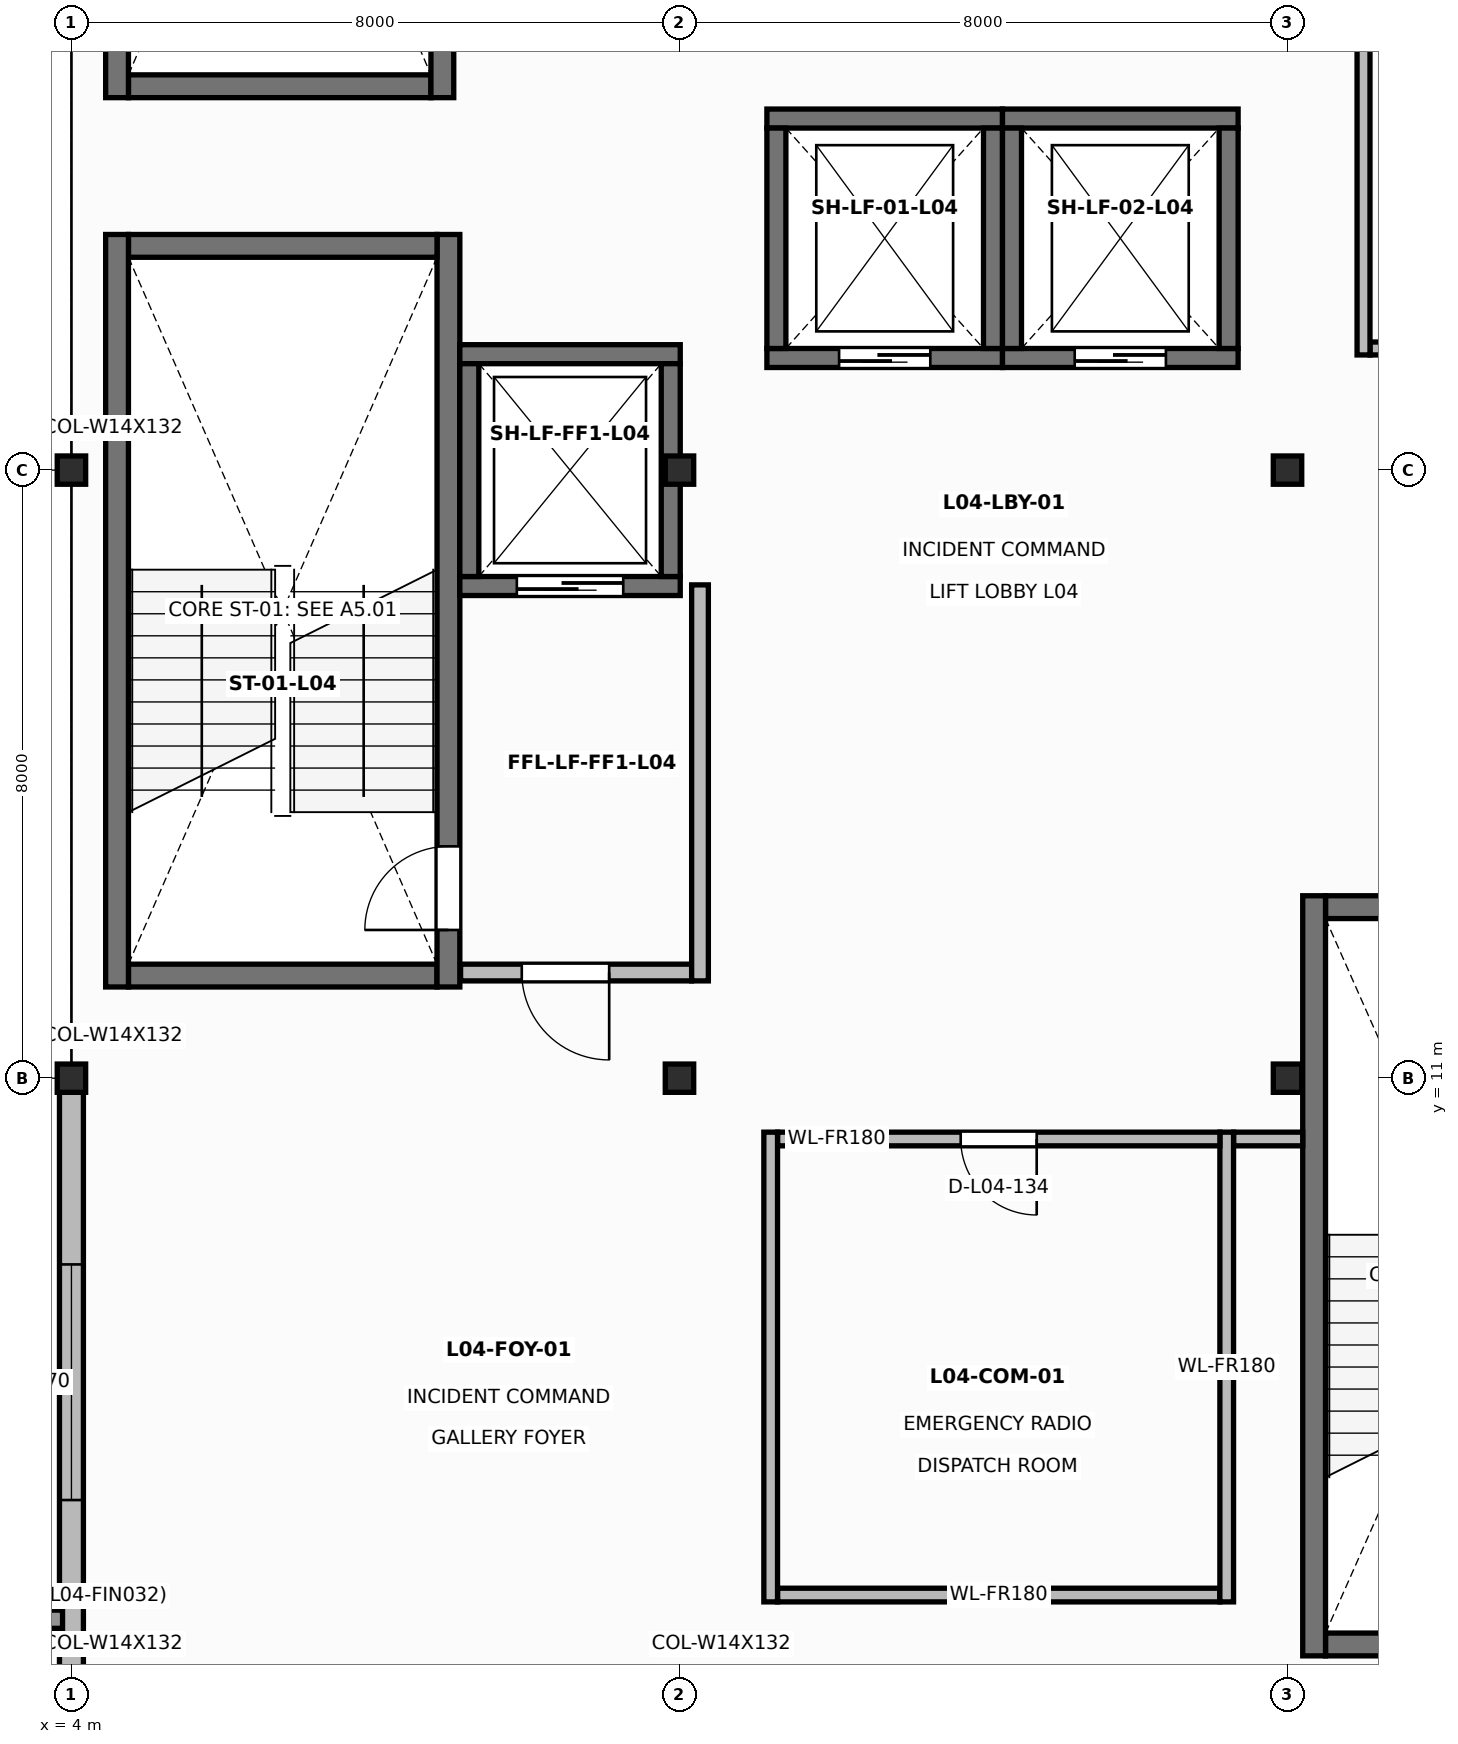
"""IFC4 building model, lengths in metres.
Left out: names, types, materials, properties, quantities, classifications, styles, units other than length and angle.
Written with IfcOpenShell. Run it as: python <this file> out.ifc"""

import sys

from ifc_helpers import new_model, si_unit, direction, frame, frame_2d, origin, origin_2d, place, context, subcontext, project, spatial, rectangle, i_section, extrude, element, fill, save


model = new_model("IFC4")
c1 = context("Model", 3, precision=1e-05, world=origin(), true_north=direction((0.0, 1.0)))
c2 = subcontext(c1, "Body", "Model", "MODEL_VIEW")
j1 = project(units=[si_unit("LENGTHUNIT", "METRE"), si_unit("PLANEANGLEUNIT", "RADIAN")], contexts=[c1])
p1 = place(None, origin())
s1 = spatial("IfcSite", under=j1, at=p1, CompositionType="ELEMENT")
p2 = place(p1, origin())
s2 = spatial("IfcBuilding", under=s1, at=p2, CompositionType="ELEMENT")
p3 = place(p2, frame((0.0, 0.0, 19.8)))
s3 = spatial("IfcBuildingStorey", under=s2, at=p3, CompositionType="ELEMENT", Elevation=19.8)
for number, where, z_axis, x_axis in (
    (1, (4.0, 11.0, 0.0), (0.0, 0.0, 1.0), (1.0, 0.0, 0.0)),
    (2, (4.0, 19.0, 0.0), (0.0, 0.0, 1.0), (1.0, 0.0, 0.0)),
    (3, (12.0, 11.0, 0.0), (0.0, 0.0, 1.0), (1.0, 0.0, 0.0)),
    (4, (12.0, 19.0, 0.0), (0.0, 0.0, 1.0), (1.0, 0.0, 0.0)),
    (5, (20.0, 11.0, 0.0), (0.0, 0.0, 1.0), (1.0, 0.0, 0.0)),
    (6, (20.0, 19.0, 0.0), (0.0, 0.0, 1.0), (1.0, 0.0, 0.0)),
):
    element("IfcColumn", number, at=place(p3, frame(where, z_axis=z_axis, x_axis=x_axis)), inside=s3, PredefinedType="COLUMN", context=c2, shape_type="SweptSolid", body=[
        extrude(i_section(OverallWidth=0.374, OverallDepth=0.372, WebThickness=0.016, FlangeThickness=0.026, at=origin_2d()), origin(), (0.0, 0.0, 1.0), 4.2),
    ])
p4 = place(p3, frame((4.75, 12.35, 0.0), z_axis=(0.0, 0.0, 1.0), x_axis=(1.0, 0.0, 0.0)))
e7 = element("IfcWall", 7, at=p4, inside=s3, PredefinedType="SHEAR", context=c2, shape_type="SweptSolid", body=[
    extrude(rectangle(XDim=4.06, YDim=0.3, at=frame_2d((2.03, 0.0))), origin(), (0.0, 0.0, 1.0), 3.98),
])
p5 = place(p3, frame((8.96, 12.2, 0.0), z_axis=(0.0, 0.0, 1.0), x_axis=(0.0, 1.0, 0.0)))
e8 = element("IfcWall", 8, at=p5, inside=s3, PredefinedType="SHEAR", context=c2, shape_type="SweptSolid", body=[
    extrude(rectangle(XDim=9.9, YDim=0.3, at=frame_2d((4.95, 0.0))), origin(), (0.0, 0.0, 1.0), 3.98),
])
p6 = place(p5, frame((0.75, 0.0, 0.0)))
e9 = element("IfcOpeningElement", 9, at=p6, cuts=e8, PredefinedType="OPENING", context=c2, shape_type="SweptSolid", body=[
    extrude(rectangle(XDim=1.1, YDim=2.15, at=frame_2d((0.55, 1.075))), frame((0.0, 0.16, 0.0), z_axis=(0.0, -1.0, 0.0), x_axis=(1.0, 0.0, 0.0)), (0.0, 0.0, 1.0), 0.32),
])
p7 = place(p3, frame((8.81, 21.95, 0.0), z_axis=(0.0, 0.0, 1.0), x_axis=(-1.0, 0.0, 0.0)))
e10 = element("IfcWall", 10, at=p7, inside=s3, PredefinedType="SHEAR", context=c2, shape_type="SweptSolid", body=[
    extrude(rectangle(XDim=4.06, YDim=0.3, at=frame_2d((2.03, 0.0))), origin(), (0.0, 0.0, 1.0), 3.98),
])
p8 = place(p3, frame((4.6, 22.1, 0.0), z_axis=(0.0, 0.0, 1.0), x_axis=(0.0, -1.0, 0.0)))
e11 = element("IfcWall", 11, at=p8, inside=s3, PredefinedType="SHEAR", context=c2, shape_type="SweptSolid", body=[
    extrude(rectangle(XDim=9.9, YDim=0.3, at=frame_2d((4.95, 0.0))), origin(), (0.0, 0.0, 1.0), 3.98),
])
p9 = place(p3, frame((4.75, 24.05, 0.0), z_axis=(0.0, 0.0, 1.0), x_axis=(1.0, 0.0, 0.0)))
e12 = element("IfcWall", 12, at=p9, inside=s3, PredefinedType="SHEAR", context=c2, shape_type="SweptSolid", body=[
    extrude(rectangle(XDim=3.98, YDim=0.3, at=frame_2d((1.99, 0.0))), origin(), (0.0, 0.0, 1.0), 3.98),
])
p10 = place(p3, frame((8.88, 23.9, 0.0), z_axis=(0.0, 0.0, 1.0), x_axis=(0.0, 1.0, 0.0)))
e13 = element("IfcWall", 13, at=p10, inside=s3, PredefinedType="SHEAR", context=c2, shape_type="SweptSolid", body=[
    extrude(rectangle(XDim=9.9, YDim=0.3, at=frame_2d((4.95, 0.0))), origin(), (0.0, 0.0, 1.0), 3.98),
])
p11 = place(p10, frame((0.75, 0.0, 0.0)))
e14 = element("IfcOpeningElement", 14, at=p11, cuts=e13, PredefinedType="OPENING", context=c2, shape_type="SweptSolid", body=[
    extrude(rectangle(XDim=1.1, YDim=2.15, at=frame_2d((0.55, 1.075))), frame((0.0, 0.16, 0.0), z_axis=(0.0, -1.0, 0.0), x_axis=(1.0, 0.0, 0.0)), (0.0, 0.0, 1.0), 0.32),
])
p12 = place(p3, frame((4.6, 33.8, 0.0), z_axis=(0.0, 0.0, 1.0), x_axis=(0.0, -1.0, 0.0)))
e15 = element("IfcWall", 15, at=p12, inside=s3, PredefinedType="SHEAR", context=c2, shape_type="SweptSolid", body=[
    extrude(rectangle(XDim=9.9, YDim=0.3, at=frame_2d((4.95, 0.0))), origin(), (0.0, 0.0, 1.0), 3.98),
])
for number, where, z_axis, x_axis in (
    (16, (20.5, 3.55, 0.0), (0.0, 0.0, 1.0), (1.0, 0.0, 0.0)),
    (17, (24.66, 13.25, 0.0), (0.0, 0.0, 1.0), (-1.0, 0.0, 0.0)),
):
    element("IfcWall", number, at=place(p3, frame(where, z_axis=z_axis, x_axis=x_axis)), inside=s3, PredefinedType="SHEAR", context=c2, shape_type="SweptSolid", body=[
        extrude(rectangle(XDim=4.16, YDim=0.3, at=frame_2d((2.08, 0.0))), origin(), (0.0, 0.0, 1.0), 3.98),
    ])
p13 = place(p3, frame((20.35, 13.4, 0.0), z_axis=(0.0, 0.0, 1.0), x_axis=(0.0, -1.0, 0.0)))
e18 = element("IfcWall", 18, at=p13, inside=s3, PredefinedType="SHEAR", context=c2, shape_type="SweptSolid", body=[
    extrude(rectangle(XDim=10.0, YDim=0.3, at=frame_2d((5.0, 0.0))), origin(), (0.0, 0.0, 1.0), 3.98),
])
p14 = place(p3, frame((9.11, 17.475, 0.0), z_axis=(0.0, 0.0, 1.0), x_axis=(1.0, 0.0, 0.0)))
e19 = element("IfcWall", 19, at=p14, inside=s3, PredefinedType="SOLIDWALL", context=c2, shape_type="SweptSolid", body=[
    extrude(rectangle(XDim=2.9, YDim=0.25, at=frame_2d((1.45, 0.0))), origin(), (0.0, 0.0, 1.0), 3.98),
])
p15 = place(p14, frame((0.75, 0.0, 0.0)))
e20 = element("IfcOpeningElement", 20, at=p15, cuts=e19, PredefinedType="OPENING", context=c2, shape_type="SweptSolid", body=[
    extrude(rectangle(XDim=1.4, YDim=2.25, at=frame_2d((0.7, 1.125))), frame((0.0, 0.135, 0.0), z_axis=(0.0, -1.0, 0.0), x_axis=(1.0, 0.0, 0.0)), (0.0, 0.0, 1.0), 0.27),
])
p16 = place(p3, frame((12.01, 20.525, 0.0), z_axis=(0.0, 0.0, 1.0), x_axis=(-1.0, 0.0, 0.0)))
e21 = element("IfcWall", 21, at=p16, inside=s3, PredefinedType="SOLIDWALL", context=c2, shape_type="SweptSolid", body=[
    extrude(rectangle(XDim=2.9, YDim=0.25, at=frame_2d((1.45, 0.0))), origin(), (0.0, 0.0, 1.0), 3.98),
])
for number, where, z_axis, x_axis in (
    (22, (11.885, 17.6, 0.0), (0.0, 0.0, 1.0), (0.0, 1.0, 0.0)),
    (23, (9.235, 20.4, 0.0), (0.0, 0.0, 1.0), (0.0, -1.0, 0.0)),
):
    element("IfcWall", number, at=place(p3, frame(where, z_axis=z_axis, x_axis=x_axis)), inside=s3, PredefinedType="SOLIDWALL", context=c2, shape_type="SweptSolid", body=[
        extrude(rectangle(XDim=2.8, YDim=0.25, at=frame_2d((1.4, 0.0))), origin(), (0.0, 0.0, 1.0), 3.98),
    ])
p17 = place(p3, frame((9.12, 12.39, 0.0), z_axis=(0.0, 0.0, 1.0), x_axis=(1.0, 0.0, 0.0)))
e24 = element("IfcWall", 24, at=p17, inside=s3, PredefinedType="SOLIDWALL", context=c2, shape_type="SweptSolid", body=[
    extrude(rectangle(XDim=3.04, YDim=0.22, at=frame_2d((1.52, 0.0))), origin(), (0.0, 0.0, 1.0), 3.364),
])
p18 = place(p17, frame((0.805, 0.0, 0.0)))
e25 = element("IfcOpeningElement", 25, at=p18, cuts=e24, PredefinedType="OPENING", context=c2, shape_type="SweptSolid", body=[
    extrude(rectangle(XDim=1.15, YDim=2.15, at=frame_2d((0.575, 1.075))), frame((0.0, 0.12, 0.0), z_axis=(0.0, -1.0, 0.0), x_axis=(1.0, 0.0, 0.0)), (0.0, 0.0, 1.0), 0.24),
])
p19 = place(p3, frame((12.27, 12.28, 0.0), z_axis=(0.0, 0.0, 1.0), x_axis=(0.0, 1.0, 0.0)))
e26 = element("IfcWall", 26, at=p19, inside=s3, PredefinedType="SOLIDWALL", context=c2, shape_type="SweptSolid", body=[
    extrude(rectangle(XDim=5.21, YDim=0.22, at=frame_2d((2.605, 0.0))), origin(), (0.0, 0.0, 1.0), 3.98),
])
p20 = place(p3, frame((13.15, 20.475, 0.0), z_axis=(0.0, 0.0, 1.0), x_axis=(1.0, 0.0, 0.0)))
e27 = element("IfcWall", 27, at=p20, inside=s3, PredefinedType="SOLIDWALL", context=c2, shape_type="SweptSolid", body=[
    extrude(rectangle(XDim=3.1, YDim=0.25, at=frame_2d((1.55, 0.0))), origin(), (0.0, 0.0, 1.0), 3.98),
])
p21 = place(p20, frame((0.95, 0.0, 0.0)))
e28 = element("IfcOpeningElement", 28, at=p21, cuts=e27, PredefinedType="OPENING", context=c2, shape_type="SweptSolid", body=[
    extrude(rectangle(XDim=1.2, YDim=2.2, at=frame_2d((0.6, 1.1))), frame((0.0, 0.135, 0.0), z_axis=(0.0, -1.0, 0.0), x_axis=(1.0, 0.0, 0.0)), (0.0, 0.0, 1.0), 0.27),
])
p22 = place(p3, frame((16.25, 23.625, 0.0), z_axis=(0.0, 0.0, 1.0), x_axis=(-1.0, 0.0, 0.0)))
e29 = element("IfcWall", 29, at=p22, inside=s3, PredefinedType="SOLIDWALL", context=c2, shape_type="SweptSolid", body=[
    extrude(rectangle(XDim=3.1, YDim=0.25, at=frame_2d((1.55, 0.0))), origin(), (0.0, 0.0, 1.0), 3.98),
])
for number, where, z_axis, x_axis in (
    (30, (16.125, 20.6, 0.0), (0.0, 0.0, 1.0), (0.0, 1.0, 0.0)),
    (31, (13.275, 23.5, 0.0), (0.0, 0.0, 1.0), (0.0, -1.0, 0.0)),
):
    element("IfcWall", number, at=place(p3, frame(where, z_axis=z_axis, x_axis=x_axis)), inside=s3, PredefinedType="SOLIDWALL", context=c2, shape_type="SweptSolid", body=[
        extrude(rectangle(XDim=2.9, YDim=0.25, at=frame_2d((1.45, 0.0))), origin(), (0.0, 0.0, 1.0), 3.98),
    ])
p23 = place(p3, frame((16.25, 20.475, 0.0), z_axis=(0.0, 0.0, 1.0), x_axis=(1.0, 0.0, 0.0)))
e32 = element("IfcWall", 32, at=p23, inside=s3, PredefinedType="SOLIDWALL", context=c2, shape_type="SweptSolid", body=[
    extrude(rectangle(XDim=3.1, YDim=0.25, at=frame_2d((1.55, 0.0))), origin(), (0.0, 0.0, 1.0), 3.98),
])
p24 = place(p23, frame((0.95, 0.0, 0.0)))
e33 = element("IfcOpeningElement", 33, at=p24, cuts=e32, PredefinedType="OPENING", context=c2, shape_type="SweptSolid", body=[
    extrude(rectangle(XDim=1.2, YDim=2.2, at=frame_2d((0.6, 1.1))), frame((0.0, 0.135, 0.0), z_axis=(0.0, -1.0, 0.0), x_axis=(1.0, 0.0, 0.0)), (0.0, 0.0, 1.0), 0.27),
])
p25 = place(p3, frame((19.35, 23.625, 0.0), z_axis=(0.0, 0.0, 1.0), x_axis=(-1.0, 0.0, 0.0)))
e34 = element("IfcWall", 34, at=p25, inside=s3, PredefinedType="SOLIDWALL", context=c2, shape_type="SweptSolid", body=[
    extrude(rectangle(XDim=3.1, YDim=0.25, at=frame_2d((1.55, 0.0))), origin(), (0.0, 0.0, 1.0), 3.98),
])
for number, where, z_axis, x_axis in (
    (35, (19.225, 20.6, 0.0), (0.0, 0.0, 1.0), (0.0, 1.0, 0.0)),
    (36, (16.375, 23.5, 0.0), (0.0, 0.0, 1.0), (0.0, -1.0, 0.0)),
):
    element("IfcWall", number, at=place(p3, frame(where, z_axis=z_axis, x_axis=x_axis)), inside=s3, PredefinedType="SOLIDWALL", context=c2, shape_type="SweptSolid", body=[
        extrude(rectangle(XDim=2.9, YDim=0.25, at=frame_2d((1.45, 0.0))), origin(), (0.0, 0.0, 1.0), 3.98),
    ])
p26 = place(p3, frame((4.0, 3.182, 0.0), z_axis=(0.0, 0.0, 1.0), x_axis=(0.0, 1.0, 0.0)))
e37 = element("IfcWall", 37, at=p26, inside=s3, PredefinedType="SOLIDWALL", context=c2, shape_type="SweptSolid", body=[
    extrude(rectangle(XDim=7.636, YDim=0.315, at=frame_2d((3.818, 0.0))), origin(), (0.0, 0.0, 1.0), 3.35),
])
p27 = place(p26, frame((2.268, 0.0, 0.85)))
e38 = element("IfcOpeningElement", 38, at=p27, cuts=e37, PredefinedType="OPENING", context=c2, shape_type="SweptSolid", body=[
    extrude(rectangle(XDim=3.1, YDim=1.75, at=frame_2d((1.55, 0.875))), frame((0.0, 0.167, 0.0), z_axis=(0.0, -1.0, 0.0), x_axis=(1.0, 0.0, 0.0)), (0.0, 0.0, 1.0), 0.335),
])
p28 = place(p3, frame((19.29, 10.2, 0.0), z_axis=(0.0, 0.0, 1.0), x_axis=(1.0, 0.0, 0.0)))
e39 = element("IfcWall", 39, at=p28, inside=s3, PredefinedType="PARTITIONING", context=c2, shape_type="SweptSolid", body=[
    extrude(rectangle(XDim=0.91, YDim=0.18, at=frame_2d((0.455, 0.0))), origin(), (0.0, 0.0, 1.0), 3.364),
])
p29 = place(p3, frame((21.085, 20.6, 0.0), z_axis=(0.0, 0.0, 1.0), x_axis=(1.0, 0.0, 0.0)))
e40 = element("IfcWall", 40, at=p29, inside=s3, PredefinedType="PARTITIONING", context=c2, shape_type="SweptSolid", body=[
    extrude(rectangle(XDim=14.03, YDim=0.17, at=frame_2d((7.015, 0.0))), origin(), (0.0, 0.0, 1.0), 3.364),
])
p30 = place(p29, frame((9.041, 0.0, 0.0)))
e41 = element("IfcOpeningElement", 41, at=p30, cuts=e40, PredefinedType="OPENING", context=c2, shape_type="SweptSolid", body=[
    extrude(rectangle(XDim=1.56, YDim=2.22, at=frame_2d((0.78, 1.11))), frame((0.0, 0.095, 0.0), z_axis=(0.0, -1.0, 0.0), x_axis=(1.0, 0.0, 0.0)), (0.0, 0.0, 1.0), 0.19),
])
p31 = place(p3, frame((21.0, 33.885, 0.0), z_axis=(0.0, 0.0, 1.0), x_axis=(0.0, -1.0, 0.0)))
e42 = element("IfcWall", 42, at=p31, inside=s3, PredefinedType="PARTITIONING", context=c2, shape_type="SweptSolid", body=[
    extrude(rectangle(XDim=13.37, YDim=0.17, at=frame_2d((6.685, 0.0))), origin(), (0.0, 0.0, 1.0), 3.2),
])
p32 = place(p3, frame((13.29, 4.2, 0.0), z_axis=(0.0, 0.0, 1.0), x_axis=(1.0, 0.0, 0.0)))
e43 = element("IfcWall", 43, at=p32, inside=s3, PredefinedType="PARTITIONING", context=c2, shape_type="SweptSolid", body=[
    extrude(rectangle(XDim=5.82, YDim=0.18, at=frame_2d((2.91, 0.0))), origin(), (0.0, 0.0, 1.0), 3.98),
])
p33 = place(p3, frame((19.2, 4.11, 0.0), z_axis=(0.0, 0.0, 1.0), x_axis=(0.0, 1.0, 0.0)))
e44 = element("IfcWall", 44, at=p33, inside=s3, PredefinedType="PARTITIONING", context=c2, shape_type="SweptSolid", body=[
    extrude(rectangle(XDim=6.18, YDim=0.18, at=frame_2d((3.09, 0.0))), origin(), (0.0, 0.0, 1.0), 3.626),
])
p34 = place(p3, frame((19.11, 10.2, 0.0), z_axis=(0.0, 0.0, 1.0), x_axis=(-1.0, 0.0, 0.0)))
e45 = element("IfcWall", 45, at=p34, inside=s3, PredefinedType="PARTITIONING", context=c2, shape_type="SweptSolid", body=[
    extrude(rectangle(XDim=5.82, YDim=0.18, at=frame_2d((2.91, 0.0))), origin(), (0.0, 0.0, 1.0), 3.98),
])
p35 = place(p34, frame((2.41, 0.0, 0.0)))
e46 = element("IfcOpeningElement", 46, at=p35, cuts=e45, PredefinedType="OPENING", context=c2, shape_type="SweptSolid", body=[
    extrude(rectangle(XDim=1.0, YDim=2.14, at=frame_2d((0.5, 1.07))), frame((0.0, 0.1, 0.0), z_axis=(0.0, -1.0, 0.0), x_axis=(1.0, 0.0, 0.0)), (0.0, 0.0, 1.0), 0.2),
])
p36 = place(p3, frame((13.2, 10.29, 0.0), z_axis=(0.0, 0.0, 1.0), x_axis=(0.0, -1.0, 0.0)))
e47 = element("IfcWall", 47, at=p36, inside=s3, PredefinedType="PARTITIONING", context=c2, shape_type="SweptSolid", body=[
    extrude(rectangle(XDim=6.18, YDim=0.18, at=frame_2d((3.09, 0.0))), origin(), (0.0, 0.0, 1.0), 3.626),
])
p37 = place(p6, origin())
e48 = element("IfcDoor", 48, at=p37, inside=s3, OperationType="SINGLE_SWING_LEFT", PredefinedType="DOOR", context=c2, shape_type="SweptSolid", body=[
    extrude(rectangle(XDim=1.1, YDim=2.15, at=frame_2d((0.55, 1.075))), frame((0.0, 0.025, 0.0), z_axis=(0.0, -1.0, 0.0), x_axis=(1.0, 0.0, 0.0)), (0.0, 0.0, 1.0), 0.05),
])
fill(e9, e48)
p38 = place(p15, frame((1.4, 0.0, 0.0), z_axis=(0.0, 0.0, 1.0), x_axis=(-1.0, 0.0, 0.0)))
e49 = element("IfcDoor", 49, at=p38, inside=s3, OperationType="DOUBLE_DOOR_SLIDING", PredefinedType="DOOR", context=c2, shape_type="SweptSolid", body=[
    extrude(rectangle(XDim=1.4, YDim=2.25, at=frame_2d((0.7, 1.125))), frame((0.0, 0.025, 0.0), z_axis=(0.0, -1.0, 0.0), x_axis=(1.0, 0.0, 0.0)), (0.0, 0.0, 1.0), 0.05),
])
fill(e20, e49)
p39 = place(p18, frame((1.15, 0.0, 0.0), z_axis=(0.0, 0.0, 1.0), x_axis=(-1.0, 0.0, 0.0)))
e50 = element("IfcDoor", 50, at=p39, inside=s3, OperationType="SINGLE_SWING_RIGHT", PredefinedType="DOOR", context=c2, shape_type="SweptSolid", body=[
    extrude(rectangle(XDim=1.15, YDim=2.15, at=frame_2d((0.575, 1.075))), frame((0.0, 0.025, 0.0), z_axis=(0.0, -1.0, 0.0), x_axis=(1.0, 0.0, 0.0)), (0.0, 0.0, 1.0), 0.05),
])
fill(e25, e50)
p40 = place(p21, frame((1.2, 0.0, 0.0), z_axis=(0.0, 0.0, 1.0), x_axis=(-1.0, 0.0, 0.0)))
e51 = element("IfcDoor", 51, at=p40, inside=s3, OperationType="DOUBLE_DOOR_SLIDING", PredefinedType="DOOR", context=c2, shape_type="SweptSolid", body=[
    extrude(rectangle(XDim=1.2, YDim=2.2, at=frame_2d((0.6, 1.1))), frame((0.0, 0.025, 0.0), z_axis=(0.0, -1.0, 0.0), x_axis=(1.0, 0.0, 0.0)), (0.0, 0.0, 1.0), 0.05),
])
fill(e28, e51)
p41 = place(p24, frame((1.2, 0.0, 0.0), z_axis=(0.0, 0.0, 1.0), x_axis=(-1.0, 0.0, 0.0)))
e52 = element("IfcDoor", 52, at=p41, inside=s3, OperationType="DOUBLE_DOOR_SLIDING", PredefinedType="DOOR", context=c2, shape_type="SweptSolid", body=[
    extrude(rectangle(XDim=1.2, YDim=2.2, at=frame_2d((0.6, 1.1))), frame((0.0, 0.025, 0.0), z_axis=(0.0, -1.0, 0.0), x_axis=(1.0, 0.0, 0.0)), (0.0, 0.0, 1.0), 0.05),
])
fill(e33, e52)
p42 = place(p27, origin())
e53 = element("IfcWindow", 53, at=p42, inside=s3, PartitioningType="SINGLE_PANEL", PredefinedType="WINDOW", context=c2, shape_type="SweptSolid", body=[
    extrude(rectangle(XDim=3.1, YDim=1.75, at=frame_2d((1.55, 0.875))), frame((0.0, 0.03, 0.0), z_axis=(0.0, -1.0, 0.0), x_axis=(1.0, 0.0, 0.0)), (0.0, 0.0, 1.0), 0.06),
])
fill(e38, e53)
p43 = place(p35, origin())
e54 = element("IfcDoor", 54, at=p43, inside=s3, OperationType="SINGLE_SWING_LEFT", PredefinedType="DOOR", context=c2, shape_type="SweptSolid", body=[
    extrude(rectangle(XDim=1.0, YDim=2.14, at=frame_2d((0.5, 1.07))), frame((0.0, 0.025, 0.0), z_axis=(0.0, -1.0, 0.0), x_axis=(1.0, 0.0, 0.0)), (0.0, 0.0, 1.0), 0.05),
])
fill(e46, e54)
save(model, sys.argv[1])
